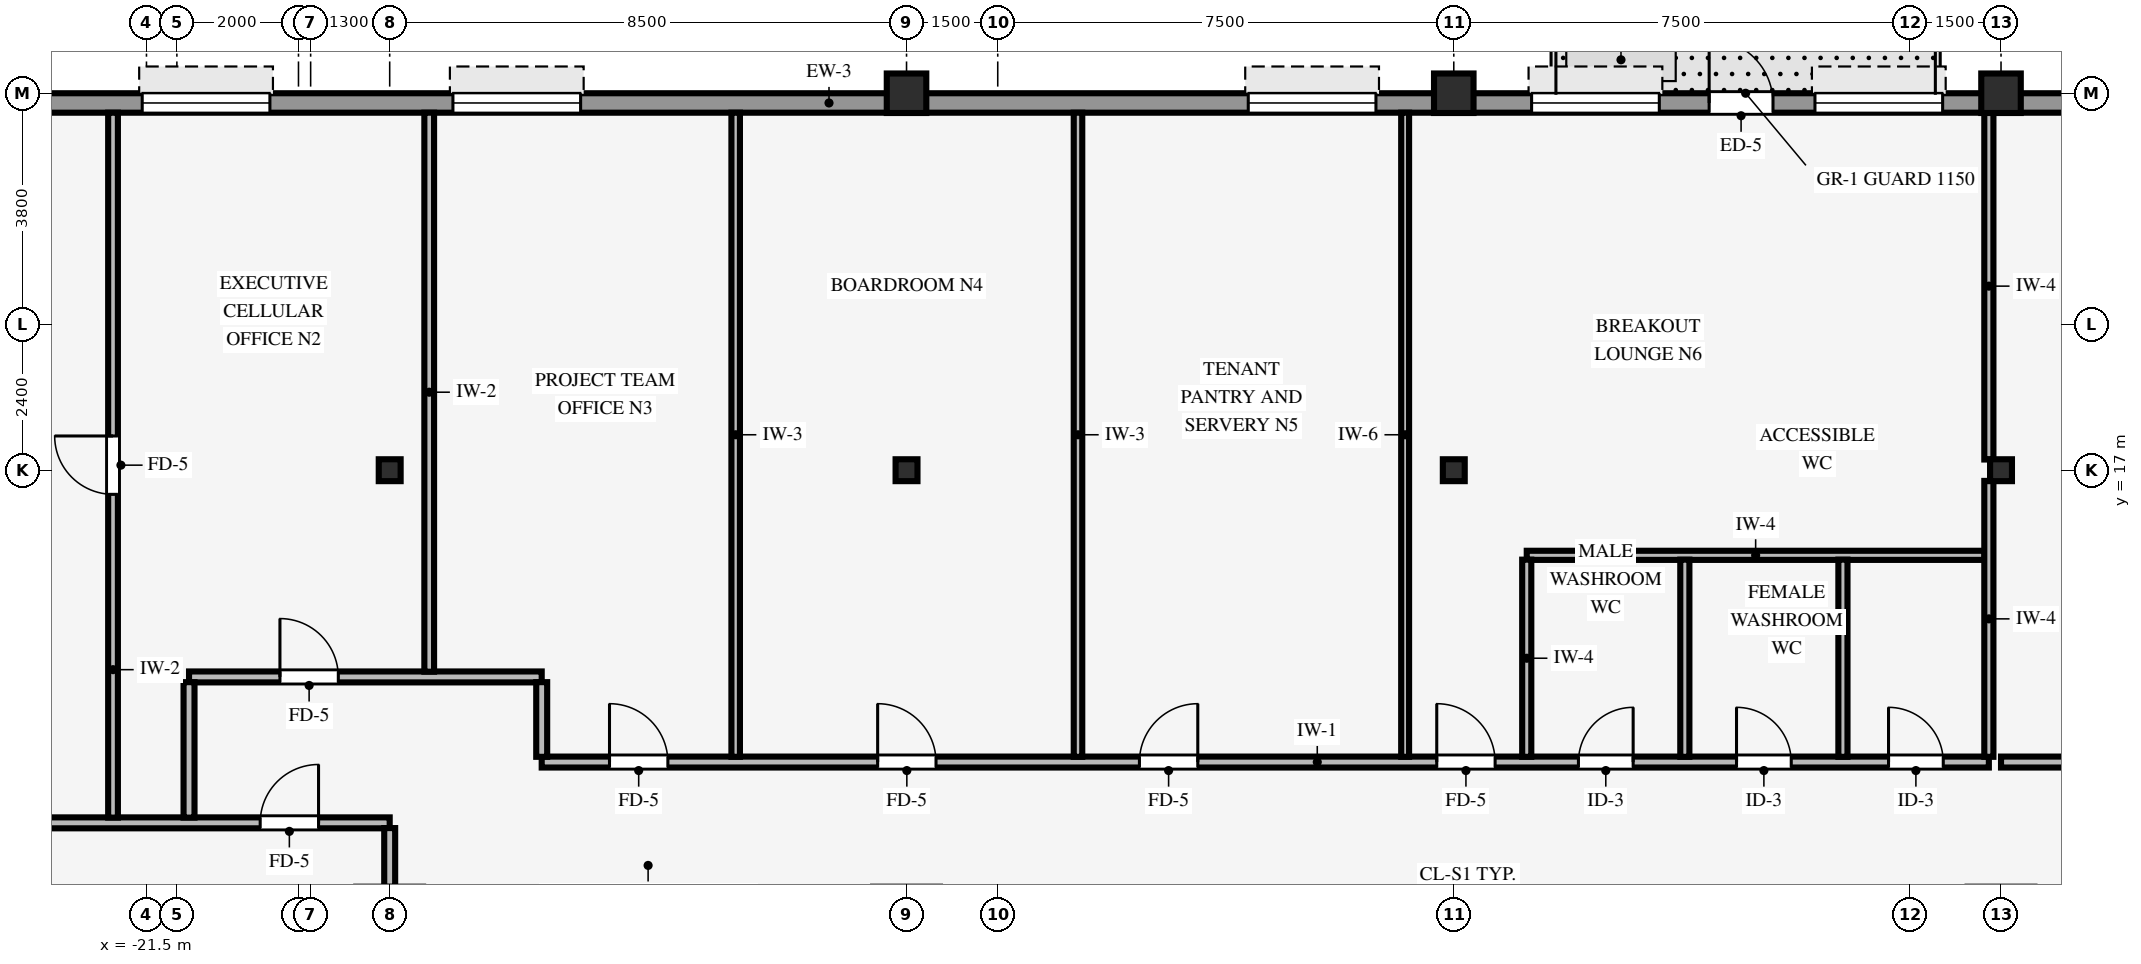
"""IFC4 building model, lengths in metres.
Left out: names, types, materials, properties, quantities, classifications, styles, units other than length and angle.
Written with IfcOpenShell. Run it as: python <this file> out.ifc"""

import sys

from ifc_helpers import new_model, si_unit, direction, frame, frame_2d, origin, origin_2d, place, context, subcontext, project, spatial, rectangle, hollow_rectangle, i_section, extrude, source, transform, mapped, element, fill, save


model = new_model("IFC4")
c1 = context("Model", 3, precision=1e-05, world=origin(), true_north=direction((0.0, 1.0)))
c2 = subcontext(c1, "Body", "Model", "MODEL_VIEW")
j1 = project(units=[si_unit("LENGTHUNIT", "METRE"), si_unit("PLANEANGLEUNIT", "RADIAN")], contexts=[c1])
p1 = place(None, origin())
s1 = spatial("IfcSite", under=j1, at=p1, CompositionType="ELEMENT")
p2 = place(p1, origin())
s2 = spatial("IfcBuilding", under=s1, at=p2, CompositionType="ELEMENT")
p3 = place(p2, frame((0.0, 0.0, 116.55)))
s3 = spatial("IfcBuildingStorey", under=s2, at=p3, CompositionType="ELEMENT", Elevation=116.55)
for number, where, z_axis, x_axis in (
    (1, (-9.0, 23.2, 0.0), (0.0, 0.0, 1.0), (1.0, 0.0, 0.0)),
    (2, (0.0, 23.2, 0.0), (0.0, 0.0, 1.0), (1.0, 0.0, 0.0)),
    (3, (9.0, 23.2, 0.0), (0.0, 0.0, 1.0), (1.0, 0.0, 0.0)),
):
    element("IfcColumn", number, at=place(p3, frame(where, z_axis=z_axis, x_axis=x_axis)), inside=s3, PredefinedType="COLUMN", context=c2, shape_type="SweptSolid", body=[
        extrude(hollow_rectangle(XDim=0.65, YDim=0.65, WallThickness=0.04, InnerFilletRadius=0.04, OuterFilletRadius=0.08, at=origin_2d()), origin(), (0.0, 0.0, 1.0), 3.37),
    ])
for number, where, z_axis, x_axis in (
    (4, (0.0, 17.0, 0.0), (0.0, 0.0, 1.0), (1.0, 0.0, 0.0)),
    (5, (-17.5, 17.0, 0.0), (0.0, 0.0, 1.0), (1.0, 0.0, 0.0)),
    (6, (-9.0, 17.0, 0.0), (0.0, 0.0, 1.0), (1.0, 0.0, 0.0)),
    (7, (9.0, 17.0, 0.0), (0.0, 0.0, 1.0), (1.0, 0.0, 0.0)),
):
    element("IfcColumn", number, at=place(p3, frame(where, z_axis=z_axis, x_axis=x_axis)), inside=s3, PredefinedType="COLUMN", context=c2, shape_type="SweptSolid", body=[
        extrude(i_section(OverallWidth=0.36, OverallDepth=0.36, WebThickness=0.021, FlangeThickness=0.021, FilletRadius=0.018, at=origin_2d()), origin(), (0.0, 0.0, 1.0), 3.37),
    ])
p4 = place(p3, frame((-24.3, 23.04, 0.0), z_axis=(0.0, 0.0, 1.0), x_axis=(1.0, 0.0, 0.0)))
e8 = element("IfcWall", 8, at=p4, inside=s3, PredefinedType="STANDARD", context=c2, shape_type="SweptSolid", body=[
    extrude(rectangle(XDim=48.6, YDim=0.32, at=frame_2d((24.3, 0.0))), origin(), (0.0, 0.0, 1.0), 2.705),
])
p5 = place(p4, frame((28.5, 0.0, 0.0)))
e9 = element("IfcOpeningElement", 9, at=p5, cuts=e8, PredefinedType="OPENING", context=c2, shape_type="SweptSolid", body=[
    extrude(rectangle(XDim=1.05, YDim=2.1, at=frame_2d((0.525, 1.05))), frame((0.0, 0.17, 0.0), z_axis=(0.0, -1.0, 0.0), x_axis=(1.0, 0.0, 0.0)), (0.0, 0.0, 1.0), 0.34),
])
p6 = place(p4, frame((2.73, 0.0, 0.8)))
e10 = element("IfcOpeningElement", 10, at=p6, cuts=e8, PredefinedType="OPENING", context=c2, shape_type="SweptSolid", body=[
    extrude(rectangle(XDim=2.1, YDim=1.56, at=frame_2d((1.05, 0.78))), frame((0.0, 0.17, 0.0), z_axis=(0.0, -1.0, 0.0), x_axis=(1.0, 0.0, 0.0)), (0.0, 0.0, 1.0), 0.34),
])
p7 = place(p4, frame((7.84, 0.0, 0.8)))
e11 = element("IfcOpeningElement", 11, at=p7, cuts=e8, PredefinedType="OPENING", context=c2, shape_type="SweptSolid", body=[
    extrude(rectangle(XDim=2.1, YDim=1.56, at=frame_2d((1.05, 0.78))), frame((0.0, 0.17, 0.0), z_axis=(0.0, -1.0, 0.0), x_axis=(1.0, 0.0, 0.0)), (0.0, 0.0, 1.0), 0.34),
])
p8 = place(p4, frame((20.92, 0.0, 0.8)))
e12 = element("IfcOpeningElement", 12, at=p8, cuts=e8, PredefinedType="OPENING", context=c2, shape_type="SweptSolid", body=[
    extrude(rectangle(XDim=2.1, YDim=1.56, at=frame_2d((1.05, 0.78))), frame((0.0, 0.17, 0.0), z_axis=(0.0, -1.0, 0.0), x_axis=(1.0, 0.0, 0.0)), (0.0, 0.0, 1.0), 0.34),
])
p9 = place(p4, frame((25.58, 0.0, 0.8)))
e13 = element("IfcOpeningElement", 13, at=p9, cuts=e8, PredefinedType="OPENING", context=c2, shape_type="SweptSolid", body=[
    extrude(rectangle(XDim=2.1, YDim=1.56, at=frame_2d((1.05, 0.78))), frame((0.0, 0.17, 0.0), z_axis=(0.0, -1.0, 0.0), x_axis=(1.0, 0.0, 0.0)), (0.0, 0.0, 1.0), 0.34),
])
p10 = place(p4, frame((30.24, 0.0, 0.8)))
e14 = element("IfcOpeningElement", 14, at=p10, cuts=e8, PredefinedType="OPENING", context=c2, shape_type="SweptSolid", body=[
    extrude(rectangle(XDim=2.1, YDim=1.56, at=frame_2d((1.05, 0.78))), frame((0.0, 0.17, 0.0), z_axis=(0.0, -1.0, 0.0), x_axis=(1.0, 0.0, 0.0)), (0.0, 0.0, 1.0), 0.34),
])
p11 = place(p4, frame((34.9, 0.0, 0.8)))
e15 = element("IfcOpeningElement", 15, at=p11, cuts=e8, PredefinedType="OPENING", context=c2, shape_type="SweptSolid", body=[
    extrude(rectangle(XDim=2.1, YDim=1.56, at=frame_2d((1.05, 0.78))), frame((0.0, 0.17, 0.0), z_axis=(0.0, -1.0, 0.0), x_axis=(1.0, 0.0, 0.0)), (0.0, 0.0, 1.0), 0.34),
])
p12 = place(p4, frame((39.56, 0.0, 0.8)))
e16 = element("IfcOpeningElement", 16, at=p12, cuts=e8, PredefinedType="OPENING", context=c2, shape_type="SweptSolid", body=[
    extrude(rectangle(XDim=2.1, YDim=1.56, at=frame_2d((1.05, 0.78))), frame((0.0, 0.17, 0.0), z_axis=(0.0, -1.0, 0.0), x_axis=(1.0, 0.0, 0.0)), (0.0, 0.0, 1.0), 0.34),
])
p13 = place(p4, frame((44.22, 0.0, 0.8)))
e17 = element("IfcOpeningElement", 17, at=p13, cuts=e8, PredefinedType="OPENING", context=c2, shape_type="SweptSolid", body=[
    extrude(rectangle(XDim=2.1, YDim=1.56, at=frame_2d((1.05, 0.78))), frame((0.0, 0.17, 0.0), z_axis=(0.0, -1.0, 0.0), x_axis=(1.0, 0.0, 0.0)), (0.0, 0.0, 1.0), 0.34),
])
p14 = place(p3, frame((-26.08, 11.2, 0.0), z_axis=(0.0, 0.0, 1.0), x_axis=(1.0, 0.0, 0.0)))
e18 = element("IfcWall", 18, at=p14, inside=s3, PredefinedType="PARTITIONING", context=c2, shape_type="SweptSolid", body=[
    extrude(rectangle(XDim=8.58, YDim=0.18, at=frame_2d((4.29, 0.0))), origin(), (0.0, 0.0, 1.0), 3.36),
])
p15 = place(p14, frame((6.45, 0.0, 0.0)))
e19 = element("IfcOpeningElement", 19, at=p15, cuts=e18, PredefinedType="OPENING", context=c2, shape_type="SweptSolid", body=[
    extrude(rectangle(XDim=0.96, YDim=2.1, at=frame_2d((0.48, 1.05))), frame((0.0, 0.1, 0.0), z_axis=(0.0, -1.0, 0.0), x_axis=(1.0, 0.0, 0.0)), (0.0, 0.0, 1.0), 0.2),
])
p16 = place(p3, frame((-15.0, 12.2, 0.0), z_axis=(0.0, 0.0, 1.0), x_axis=(1.0, 0.0, 0.0)))
e20 = element("IfcWall", 20, at=p16, inside=s3, PredefinedType="PARTITIONING", context=c2, shape_type="SweptSolid", body=[
    extrude(rectangle(XDim=23.8, YDim=0.18, at=frame_2d((11.9, 0.0))), origin(), (0.0, 0.0, 1.0), 3.36),
])
p17 = place(p16, frame((5.525, 0.0, 0.0)))
e21 = element("IfcOpeningElement", 21, at=p17, cuts=e20, PredefinedType="OPENING", context=c2, shape_type="SweptSolid", body=[
    extrude(rectangle(XDim=0.96, YDim=2.1, at=frame_2d((0.48, 1.05))), frame((0.0, 0.1, 0.0), z_axis=(0.0, -1.0, 0.0), x_axis=(1.0, 0.0, 0.0)), (0.0, 0.0, 1.0), 0.2),
])
p18 = place(p16, frame((1.115, 0.0, 0.0)))
e22 = element("IfcOpeningElement", 22, at=p18, cuts=e20, PredefinedType="OPENING", context=c2, shape_type="SweptSolid", body=[
    extrude(rectangle(XDim=0.96, YDim=2.1, at=frame_2d((0.48, 1.05))), frame((0.0, 0.1, 0.0), z_axis=(0.0, -1.0, 0.0), x_axis=(1.0, 0.0, 0.0)), (0.0, 0.0, 1.0), 0.2),
])
p19 = place(p16, frame((9.83, 0.0, 0.0)))
e23 = element("IfcOpeningElement", 23, at=p19, cuts=e20, PredefinedType="OPENING", context=c2, shape_type="SweptSolid", body=[
    extrude(rectangle(XDim=0.96, YDim=2.1, at=frame_2d((0.48, 1.05))), frame((0.0, 0.1, 0.0), z_axis=(0.0, -1.0, 0.0), x_axis=(1.0, 0.0, 0.0)), (0.0, 0.0, 1.0), 0.2),
])
p20 = place(p16, frame((19.65, 0.0, 0.0)))
e24 = element("IfcOpeningElement", 24, at=p20, cuts=e20, PredefinedType="OPENING", context=c2, shape_type="SweptSolid", body=[
    extrude(rectangle(XDim=0.9, YDim=2.1, at=frame_2d((0.45, 1.05))), frame((0.0, 0.1, 0.0), z_axis=(0.0, -1.0, 0.0), x_axis=(1.0, 0.0, 0.0)), (0.0, 0.0, 1.0), 0.2),
])
p21 = place(p16, frame((17.05, 0.0, 0.0)))
e25 = element("IfcOpeningElement", 25, at=p21, cuts=e20, PredefinedType="OPENING", context=c2, shape_type="SweptSolid", body=[
    extrude(rectangle(XDim=0.9, YDim=2.1, at=frame_2d((0.45, 1.05))), frame((0.0, 0.1, 0.0), z_axis=(0.0, -1.0, 0.0), x_axis=(1.0, 0.0, 0.0)), (0.0, 0.0, 1.0), 0.2),
])
p22 = place(p16, frame((22.15, 0.0, 0.0)))
e26 = element("IfcOpeningElement", 26, at=p22, cuts=e20, PredefinedType="OPENING", context=c2, shape_type="SweptSolid", body=[
    extrude(rectangle(XDim=0.9, YDim=2.1, at=frame_2d((0.45, 1.05))), frame((0.0, 0.1, 0.0), z_axis=(0.0, -1.0, 0.0), x_axis=(1.0, 0.0, 0.0)), (0.0, 0.0, 1.0), 0.2),
])
p23 = place(p16, frame((14.72, 0.0, 0.0)))
e27 = element("IfcOpeningElement", 27, at=p23, cuts=e20, PredefinedType="OPENING", context=c2, shape_type="SweptSolid", body=[
    extrude(rectangle(XDim=0.96, YDim=2.1, at=frame_2d((0.48, 1.05))), frame((0.0, 0.1, 0.0), z_axis=(0.0, -1.0, 0.0), x_axis=(1.0, 0.0, 0.0)), (0.0, 0.0, 1.0), 0.2),
])
p24 = place(p3, frame((9.0, 12.2, 0.0), z_axis=(0.0, 0.0, 1.0), x_axis=(1.0, 0.0, 0.0)))
e28 = element("IfcWall", 28, at=p24, inside=s3, PredefinedType="PARTITIONING", context=c2, shape_type="SweptSolid", body=[
    extrude(rectangle(XDim=6.0, YDim=0.18, at=frame_2d((3.0, 0.0))), origin(), (0.0, 0.0, 1.0), 3.36),
])
p25 = place(p24, frame((2.52, 0.0, 0.0)))
e29 = element("IfcOpeningElement", 29, at=p25, cuts=e28, PredefinedType="OPENING", context=c2, shape_type="SweptSolid", body=[
    extrude(rectangle(XDim=0.96, YDim=2.1, at=frame_2d((0.48, 1.05))), frame((0.0, 0.1, 0.0), z_axis=(0.0, -1.0, 0.0), x_axis=(1.0, 0.0, 0.0)), (0.0, 0.0, 1.0), 0.2),
])
p26 = place(p3, frame((-20.8, 13.6, 0.0), z_axis=(0.0, 0.0, 1.0), x_axis=(1.0, 0.0, 0.0)))
e30 = element("IfcWall", 30, at=p26, inside=s3, PredefinedType="PARTITIONING", context=c2, shape_type="SweptSolid", body=[
    extrude(rectangle(XDim=5.8, YDim=0.18, at=frame_2d((2.9, 0.0))), origin(), (0.0, 0.0, 1.0), 2.998),
])
p27 = place(p26, frame((1.495, 0.0, 0.0)))
e31 = element("IfcOpeningElement", 31, at=p27, cuts=e30, PredefinedType="OPENING", context=c2, shape_type="SweptSolid", body=[
    extrude(rectangle(XDim=0.96, YDim=2.1, at=frame_2d((0.48, 1.05))), frame((0.0, 0.1, 0.0), z_axis=(0.0, -1.0, 0.0), x_axis=(1.0, 0.0, 0.0)), (0.0, 0.0, 1.0), 0.2),
])
p28 = place(p3, frame((1.2, 15.6, 0.0), z_axis=(0.0, 0.0, 1.0), x_axis=(1.0, 0.0, 0.0)))
e32 = element("IfcWall", 32, at=p28, inside=s3, PredefinedType="PARTITIONING", context=c2, shape_type="SweptSolid", body=[
    extrude(rectangle(XDim=7.529, YDim=0.15, at=frame_2d((3.765, 0.0))), origin(), (0.0, 0.0, 1.0), 3.36),
])
p29 = place(p3, frame((-22.05, 11.286, 0.0), z_axis=(0.0, 0.0, 1.0), x_axis=(0.0, 1.0, 0.0)))
e33 = element("IfcWall", 33, at=p29, inside=s3, PredefinedType="PARTITIONING", context=c2, shape_type="SweptSolid", body=[
    extrude(rectangle(XDim=11.594, YDim=0.16, at=frame_2d((5.797, 0.0))), origin(), (0.0, 0.0, 1.0), 3.36),
])
p30 = place(p29, frame((5.317, 0.0, 0.0)))
e34 = element("IfcOpeningElement", 34, at=p30, cuts=e33, PredefinedType="OPENING", context=c2, shape_type="SweptSolid", body=[
    extrude(rectangle(XDim=0.96, YDim=2.1, at=frame_2d((0.48, 1.05))), frame((0.0, 0.09, 0.0), z_axis=(0.0, -1.0, 0.0), x_axis=(1.0, 0.0, 0.0)), (0.0, 0.0, 1.0), 0.18),
])
p31 = place(p3, frame((-20.8, 11.286, 0.0), z_axis=(0.0, 0.0, 1.0), x_axis=(0.0, 1.0, 0.0)))
e35 = element("IfcWall", 35, at=p31, inside=s3, PredefinedType="PARTITIONING", context=c2, shape_type="SweptSolid", body=[
    extrude(rectangle(XDim=2.228, YDim=0.18, at=frame_2d((1.114, 0.0))), origin(), (0.0, 0.0, 1.0), 3.36),
])
p32 = place(p3, frame((-17.5, 10.146, 0.0), z_axis=(0.0, 0.0, 1.0), x_axis=(0.0, 1.0, 0.0)))
e36 = element("IfcWall", 36, at=p32, inside=s3, PredefinedType="PARTITIONING", context=c2, shape_type="SweptSolid", body=[
    extrude(rectangle(XDim=0.968, YDim=0.18, at=frame_2d((0.484, 0.0))), origin(), (0.0, 0.0, 1.0), 2.738),
])
p33 = place(p3, frame((-16.85, 13.686, 0.0), z_axis=(0.0, 0.0, 1.0), x_axis=(0.0, 1.0, 0.0)))
e37 = element("IfcWall", 37, at=p33, inside=s3, PredefinedType="PARTITIONING", context=c2, shape_type="SweptSolid", body=[
    extrude(rectangle(XDim=9.194, YDim=0.16, at=frame_2d((4.597, 0.0))), origin(), (0.0, 0.0, 1.0), 3.36),
])
p34 = place(p3, frame((-15.0, 12.286, 0.0), z_axis=(0.0, 0.0, 1.0), x_axis=(0.0, 1.0, 0.0)))
e38 = element("IfcWall", 38, at=p34, inside=s3, PredefinedType="PARTITIONING", context=c2, shape_type="SweptSolid", body=[
    extrude(rectangle(XDim=1.228, YDim=0.18, at=frame_2d((0.614, 0.0))), origin(), (0.0, 0.0, 1.0), 3.36),
])
for number, where, z_axis, x_axis in (
    (39, (-11.81, 12.286, 0.0), (0.0, 0.0, 1.0), (0.0, 1.0, 0.0)),
    (40, (-6.18, 12.286, 0.0), (0.0, 0.0, 1.0), (0.0, 1.0, 0.0)),
):
    element("IfcWall", number, at=place(p3, frame(where, z_axis=z_axis, x_axis=x_axis)), inside=s3, PredefinedType="PARTITIONING", context=c2, shape_type="SweptSolid", body=[
        extrude(rectangle(XDim=10.594, YDim=0.14, at=frame_2d((5.297, 0.0))), origin(), (0.0, 0.0, 1.0), 3.36),
    ])
p35 = place(p3, frame((-0.8, 12.286, 0.0), z_axis=(0.0, 0.0, 1.0), x_axis=(0.0, 1.0, 0.0)))
e41 = element("IfcWall", 41, at=p35, inside=s3, PredefinedType="PARTITIONING", context=c2, shape_type="SweptSolid", body=[
    extrude(rectangle(XDim=10.594, YDim=0.13, at=frame_2d((5.297, 0.0))), origin(), (0.0, 0.0, 1.0), 3.36),
])
for number, where, z_axis, x_axis in (
    (42, (1.2, 12.286, 0.0), (0.0, 0.0, 1.0), (0.0, 1.0, 0.0)),
    (43, (3.8, 12.286, 0.0), (0.0, 0.0, 1.0), (0.0, 1.0, 0.0)),
    (44, (6.4, 12.286, 0.0), (0.0, 0.0, 1.0), (0.0, 1.0, 0.0)),
):
    element("IfcWall", number, at=place(p3, frame(where, z_axis=z_axis, x_axis=x_axis)), inside=s3, PredefinedType="PARTITIONING", context=c2, shape_type="SweptSolid", body=[
        extrude(rectangle(XDim=3.243, YDim=0.15, at=frame_2d((1.622, 0.0))), origin(), (0.0, 0.0, 1.0), 3.36),
    ])
p36 = place(p3, frame((8.8, 12.286, 0.0), z_axis=(0.0, 0.0, 1.0), x_axis=(0.0, 1.0, 0.0)))
e45 = element("IfcWall", 45, at=p36, inside=s3, PredefinedType="PARTITIONING", context=c2, shape_type="SweptSolid", body=[
    extrude(rectangle(XDim=4.538, YDim=0.15, at=frame_2d((2.269, 0.0))), origin(), (0.0, 0.0, 1.0), 2.738),
])
p37 = place(p3, frame((8.8, 17.176, 0.0), z_axis=(0.0, 0.0, 1.0), x_axis=(0.0, 1.0, 0.0)))
e46 = element("IfcWall", 46, at=p37, inside=s3, PredefinedType="PARTITIONING", context=c2, shape_type="SweptSolid", body=[
    extrude(rectangle(XDim=5.703, YDim=0.15, at=frame_2d((2.852, 0.0))), origin(), (0.0, 0.0, 1.0), 2.738),
])
m1 = source(origin(), c2, "Body", "SweptSolid", [
    extrude(rectangle(XDim=1.05, YDim=2.1, at=frame_2d((0.525, 1.05))), frame((0.0, 0.025, 0.0), z_axis=(0.0, -1.0, 0.0), x_axis=(1.0, 0.0, 0.0)), (0.0, 0.0, 1.0), 0.05),
])
p38 = place(p5, origin())
e47 = element("IfcDoor", 47, at=p38, inside=s3, OperationType="SINGLE_SWING_LEFT", PredefinedType="DOOR", context=c2, shape_type="MappedRepresentation", body=[
    mapped(m1, transform((0.0, 0.0, 0.0), scale=1.0)),
])
fill(e9, e47)
m2 = source(origin(), c2, "Body", "SweptSolid", [
    extrude(rectangle(XDim=2.1, YDim=1.56, at=frame_2d((1.05, 0.78))), frame((0.0, 0.03, 0.0), z_axis=(0.0, -1.0, 0.0), x_axis=(1.0, 0.0, 0.0)), (0.0, 0.0, 1.0), 0.06),
])
p39 = place(p6, origin())
e48 = element("IfcWindow", 48, at=p39, inside=s3, PartitioningType="SINGLE_PANEL", PredefinedType="WINDOW", context=c2, shape_type="MappedRepresentation", body=[
    mapped(m2, transform((0.0, 0.0, 0.0), scale=1.0)),
])
fill(e10, e48)
p40 = place(p7, origin())
e49 = element("IfcWindow", 49, at=p40, inside=s3, PartitioningType="SINGLE_PANEL", PredefinedType="WINDOW", context=c2, shape_type="MappedRepresentation", body=[
    mapped(m2, transform((0.0, 0.0, 0.0), scale=1.0)),
])
fill(e11, e49)
p41 = place(p8, origin())
e50 = element("IfcWindow", 50, at=p41, inside=s3, PartitioningType="SINGLE_PANEL", PredefinedType="WINDOW", context=c2, shape_type="MappedRepresentation", body=[
    mapped(m2, transform((0.0, 0.0, 0.0), scale=1.0)),
])
fill(e12, e50)
p42 = place(p9, origin())
e51 = element("IfcWindow", 51, at=p42, inside=s3, PartitioningType="SINGLE_PANEL", PredefinedType="WINDOW", context=c2, shape_type="MappedRepresentation", body=[
    mapped(m2, transform((0.0, 0.0, 0.0), scale=1.0)),
])
fill(e13, e51)
p43 = place(p10, origin())
e52 = element("IfcWindow", 52, at=p43, inside=s3, PartitioningType="SINGLE_PANEL", PredefinedType="WINDOW", context=c2, shape_type="MappedRepresentation", body=[
    mapped(m2, transform((0.0, 0.0, 0.0), scale=1.0)),
])
fill(e14, e52)
m3 = source(origin(), c2, "Body", "SweptSolid", [
    extrude(rectangle(XDim=0.96, YDim=2.1, at=frame_2d((0.48, 1.05))), frame((0.0, 0.025, 0.0), z_axis=(0.0, -1.0, 0.0), x_axis=(1.0, 0.0, 0.0)), (0.0, 0.0, 1.0), 0.05),
])
p44 = place(p17, origin())
e53 = element("IfcDoor", 53, at=p44, inside=s3, OperationType="SINGLE_SWING_LEFT", PredefinedType="DOOR", context=c2, shape_type="MappedRepresentation", body=[
    mapped(m3, transform((0.0, 0.0, 0.0), scale=1.0)),
])
fill(e21, e53)
p45 = place(p27, origin())
e54 = element("IfcDoor", 54, at=p45, inside=s3, OperationType="SINGLE_SWING_LEFT", PredefinedType="DOOR", context=c2, shape_type="MappedRepresentation", body=[
    mapped(m3, transform((0.0, 0.0, 0.0), scale=1.0)),
])
fill(e31, e54)
p46 = place(p15, origin())
e55 = element("IfcDoor", 55, at=p46, inside=s3, OperationType="SINGLE_SWING_RIGHT", PredefinedType="DOOR", context=c2, shape_type="MappedRepresentation", body=[
    mapped(m3, transform((0.0, 0.0, 0.0), scale=1.0)),
])
fill(e19, e55)
p47 = place(p18, origin())
e56 = element("IfcDoor", 56, at=p47, inside=s3, OperationType="SINGLE_SWING_LEFT", PredefinedType="DOOR", context=c2, shape_type="MappedRepresentation", body=[
    mapped(m3, transform((0.0, 0.0, 0.0), scale=1.0)),
])
fill(e22, e56)
p48 = place(p19, origin())
e57 = element("IfcDoor", 57, at=p48, inside=s3, OperationType="SINGLE_SWING_RIGHT", PredefinedType="DOOR", context=c2, shape_type="MappedRepresentation", body=[
    mapped(m3, transform((0.0, 0.0, 0.0), scale=1.0)),
])
fill(e23, e57)
m4 = source(origin(), c2, "Body", "SweptSolid", [
    extrude(rectangle(XDim=0.9, YDim=2.1, at=frame_2d((0.45, 1.05))), frame((0.0, 0.025, 0.0), z_axis=(0.0, -1.0, 0.0), x_axis=(1.0, 0.0, 0.0)), (0.0, 0.0, 1.0), 0.05),
])
p49 = place(p20, origin())
e58 = element("IfcDoor", 58, at=p49, inside=s3, OperationType="SINGLE_SWING_LEFT", PredefinedType="DOOR", context=c2, shape_type="MappedRepresentation", body=[
    mapped(m4, transform((0.0, 0.0, 0.0), scale=1.0)),
])
fill(e24, e58)
p50 = place(p21, origin())
e59 = element("IfcDoor", 59, at=p50, inside=s3, OperationType="SINGLE_SWING_RIGHT", PredefinedType="DOOR", context=c2, shape_type="MappedRepresentation", body=[
    mapped(m4, transform((0.0, 0.0, 0.0), scale=1.0)),
])
fill(e25, e59)
p51 = place(p22, origin())
e60 = element("IfcDoor", 60, at=p51, inside=s3, OperationType="SINGLE_SWING_LEFT", PredefinedType="DOOR", context=c2, shape_type="MappedRepresentation", body=[
    mapped(m4, transform((0.0, 0.0, 0.0), scale=1.0)),
])
fill(e26, e60)
p52 = place(p23, origin())
e61 = element("IfcDoor", 61, at=p52, inside=s3, OperationType="SINGLE_SWING_LEFT", PredefinedType="DOOR", context=c2, shape_type="MappedRepresentation", body=[
    mapped(m3, transform((0.0, 0.0, 0.0), scale=1.0)),
])
fill(e27, e61)
p53 = place(p30, origin())
e62 = element("IfcDoor", 62, at=p53, inside=s3, OperationType="SINGLE_SWING_RIGHT", PredefinedType="DOOR", context=c2, shape_type="MappedRepresentation", body=[
    mapped(m3, transform((0.0, 0.0, 0.0), scale=1.0)),
])
fill(e34, e62)
save(model, sys.argv[1])
